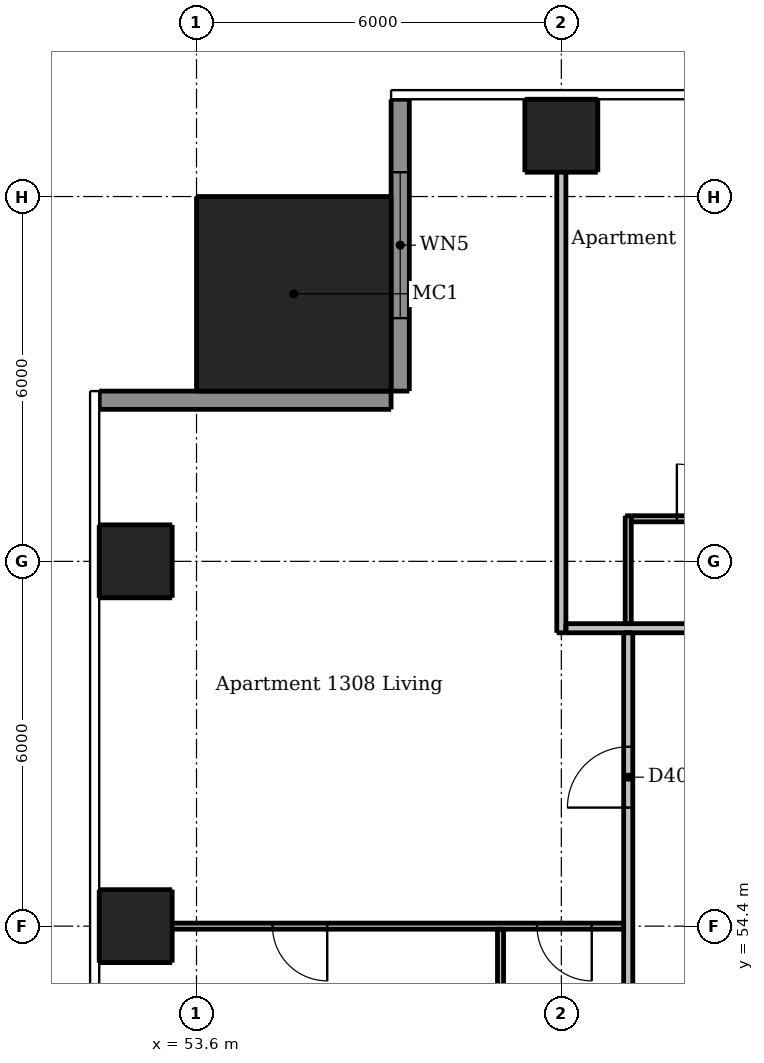
"""IFC4 building model, lengths in metres.
Left out: names, types, materials, properties, quantities, classifications, styles, units other than length and angle.
Written with IfcOpenShell. Run it as: python <this file> out.ifc"""

import sys

from ifc_helpers import new_model, si_unit, direction, frame, frame_2d, origin, origin_2d, place, context, subcontext, project, spatial, rectangle, extrude, element, fill, save


model = new_model("IFC4")
c1 = context("Model", 3, precision=1e-05, world=origin(), true_north=direction((0.0, 1.0)))
c2 = subcontext(c1, "Body", "Model", "MODEL_VIEW")
j1 = project(units=[si_unit("LENGTHUNIT", "METRE"), si_unit("PLANEANGLEUNIT", "RADIAN")], contexts=[c1])
p1 = place(None, origin())
s1 = spatial("IfcSite", under=j1, at=p1, CompositionType="ELEMENT")
p2 = place(p1, origin())
s2 = spatial("IfcBuilding", under=s1, at=p2, CompositionType="ELEMENT")
p3 = place(p2, frame((0.0, 0.0, 49.9)))
s3 = spatial("IfcBuildingStorey", under=s2, at=p3, CompositionType="ELEMENT", Elevation=49.9)
for number, where, z_axis, x_axis in (
    (1, (59.6, 67.4, 0.0), (0.0, 0.0, 1.0), (1.0, 0.0, 0.0)),
    (2, (52.6, 54.4, 0.0), (0.0, 0.0, 1.0), (1.0, 0.0, 0.0)),
    (3, (52.6, 60.4, 0.0), (0.0, 0.0, 1.0), (1.0, 0.0, 0.0)),
):
    element("IfcColumn", number, at=place(p3, frame(where, z_axis=z_axis, x_axis=x_axis)), inside=s3, PredefinedType="COLUMN", context=c2, shape_type="SweptSolid", body=[
        extrude(rectangle(XDim=1.2, YDim=1.2, at=origin_2d()), origin(), (0.0, 0.0, 1.0), 3.05),
    ])
p4 = place(p3, frame((55.2, 64.8, 0.0), z_axis=(0.0, 0.0, 1.0), x_axis=(1.0, 0.0, 0.0)))
e4 = element("IfcColumn", 4, at=p4, inside=s3, PredefinedType="COLUMN", context=c2, shape_type="SweptSolid", body=[
    extrude(rectangle(XDim=3.2, YDim=3.2, at=origin_2d()), origin(), (0.0, 0.0, 1.0), 3.3),
])
p5 = place(p3, frame((56.95, 68.0, 0.0), z_axis=(0.0, 0.0, 1.0), x_axis=(0.0, -1.0, 0.0)))
e5 = element("IfcWall", 5, at=p5, inside=s3, PredefinedType="SOLIDWALL", context=c2, shape_type="SweptSolid", body=[
    extrude(rectangle(XDim=4.8, YDim=0.3, at=frame_2d((2.4, 0.0))), origin(), (0.0, 0.0, 1.0), 3.05),
])
p6 = place(p5, frame((1.2, 0.0, 0.15)))
e6 = element("IfcOpeningElement", 6, at=p6, cuts=e5, PredefinedType="OPENING", context=c2, shape_type="SweptSolid", body=[
    extrude(rectangle(XDim=2.4, YDim=2.1, at=frame_2d((1.2, 1.05))), frame((0.0, 0.16, 0.0), z_axis=(0.0, -1.0, 0.0), x_axis=(1.0, 0.0, 0.0)), (0.0, 0.0, 1.0), 0.32),
])
p7 = place(p3, frame((56.8, 63.05, 0.0), z_axis=(0.0, 0.0, 1.0), x_axis=(-1.0, 0.0, 0.0)))
e7 = element("IfcWall", 7, at=p7, inside=s3, PredefinedType="SOLIDWALL", context=c2, shape_type="SweptSolid", body=[
    extrude(rectangle(XDim=4.8, YDim=0.3, at=frame_2d((2.4, 0.0))), origin(), (0.0, 0.0, 1.0), 3.05),
])
p8 = place(p3, frame((58.6, 54.35, 0.0), z_axis=(0.0, 0.0, 1.0), x_axis=(0.0, -1.0, 0.0)))
e8 = element("IfcWall", 8, at=p8, inside=s3, PredefinedType="PARTITIONING", context=c2, shape_type="SweptSolid", body=[
    extrude(rectangle(XDim=9.6, YDim=0.1, at=frame_2d((4.8, 0.0))), origin(), (0.0, 0.0, 1.0), 3.05),
])
p9 = place(p8, frame((7.35, 0.0, 0.0)))
e9 = element("IfcOpeningElement", 9, at=p9, cuts=e8, PredefinedType="OPENING", context=c2, shape_type="SweptSolid", body=[
    extrude(rectangle(XDim=0.8, YDim=2.1, at=frame_2d((0.4, 1.05))), frame((0.0, 0.06, 0.0), z_axis=(0.0, -1.0, 0.0), x_axis=(1.0, 0.0, 0.0)), (0.0, 0.0, 1.0), 0.12),
])
p10 = place(p8, frame((3.75, 0.0, 0.0)))
e10 = element("IfcOpeningElement", 10, at=p10, cuts=e8, PredefinedType="OPENING", context=c2, shape_type="SweptSolid", body=[
    extrude(rectangle(XDim=0.8, YDim=2.1, at=frame_2d((0.4, 1.05))), frame((0.0, 0.06, 0.0), z_axis=(0.0, -1.0, 0.0), x_axis=(1.0, 0.0, 0.0)), (0.0, 0.0, 1.0), 0.12),
])
p11 = place(p3, frame((60.7, 59.375, 0.0), z_axis=(0.0, 0.0, 1.0), x_axis=(0.0, 1.0, 0.0)))
e11 = element("IfcWall", 11, at=p11, inside=s3, PredefinedType="PARTITIONING", context=c2, shape_type="SweptSolid", body=[
    extrude(rectangle(XDim=1.775, YDim=0.1, at=frame_2d((0.887, 0.0))), origin(), (0.0, 0.0, 1.0), 3.05),
])
p12 = place(p3, frame((60.75, 61.1, 0.0), z_axis=(0.0, 0.0, 1.0), x_axis=(1.0, 0.0, 0.0)))
e12 = element("IfcWall", 12, at=p12, inside=s3, PredefinedType="PARTITIONING", context=c2, shape_type="SweptSolid", body=[
    extrude(rectangle(XDim=16.775, YDim=0.1, at=frame_2d((8.387, 0.0))), origin(), (0.0, 0.0, 1.0), 3.05),
])
p13 = place(p12, frame((11.3, 0.0, 0.0)))
e13 = element("IfcOpeningElement", 13, at=p13, cuts=e12, PredefinedType="OPENING", context=c2, shape_type="SweptSolid", body=[
    extrude(rectangle(XDim=0.9, YDim=2.1, at=frame_2d((0.45, 1.05))), frame((0.0, 0.06, 0.0), z_axis=(0.0, -1.0, 0.0), x_axis=(1.0, 0.0, 0.0)), (0.0, 0.0, 1.0), 0.12),
])
p14 = place(p12, frame((15.2, 0.0, 0.0)))
e14 = element("IfcOpeningElement", 14, at=p14, cuts=e12, PredefinedType="OPENING", context=c2, shape_type="SweptSolid", body=[
    extrude(rectangle(XDim=0.9, YDim=2.1, at=frame_2d((0.45, 1.05))), frame((0.0, 0.06, 0.0), z_axis=(0.0, -1.0, 0.0), x_axis=(1.0, 0.0, 0.0)), (0.0, 0.0, 1.0), 0.12),
])
p15 = place(p12, frame((13.1, 0.0, 0.0)))
e15 = element("IfcOpeningElement", 15, at=p15, cuts=e12, PredefinedType="OPENING", context=c2, shape_type="SweptSolid", body=[
    extrude(rectangle(XDim=0.9, YDim=2.1, at=frame_2d((0.45, 1.05))), frame((0.0, 0.06, 0.0), z_axis=(0.0, -1.0, 0.0), x_axis=(1.0, 0.0, 0.0)), (0.0, 0.0, 1.0), 0.12),
])
p16 = place(p12, frame((0.75, 0.0, 0.0)))
e16 = element("IfcOpeningElement", 16, at=p16, cuts=e12, PredefinedType="OPENING", context=c2, shape_type="SweptSolid", body=[
    extrude(rectangle(XDim=0.9, YDim=2.1, at=frame_2d((0.45, 1.05))), frame((0.0, 0.06, 0.0), z_axis=(0.0, -1.0, 0.0), x_axis=(1.0, 0.0, 0.0)), (0.0, 0.0, 1.0), 0.12),
])
p17 = place(p12, frame((6.2, 0.0, 0.0)))
e17 = element("IfcOpeningElement", 17, at=p17, cuts=e12, PredefinedType="OPENING", context=c2, shape_type="SweptSolid", body=[
    extrude(rectangle(XDim=0.9, YDim=2.1, at=frame_2d((0.45, 1.05))), frame((0.0, 0.06, 0.0), z_axis=(0.0, -1.0, 0.0), x_axis=(1.0, 0.0, 0.0)), (0.0, 0.0, 1.0), 0.12),
])
p18 = place(p12, frame((3.25, 0.0, 0.0)))
e18 = element("IfcOpeningElement", 18, at=p18, cuts=e12, PredefinedType="OPENING", context=c2, shape_type="SweptSolid", body=[
    extrude(rectangle(XDim=0.8, YDim=2.1, at=frame_2d((0.4, 1.05))), frame((0.0, 0.06, 0.0), z_axis=(0.0, -1.0, 0.0), x_axis=(1.0, 0.0, 0.0)), (0.0, 0.0, 1.0), 0.12),
])
p19 = place(p12, frame((9.25, 0.0, 0.0)))
e19 = element("IfcOpeningElement", 19, at=p19, cuts=e12, PredefinedType="OPENING", context=c2, shape_type="SweptSolid", body=[
    extrude(rectangle(XDim=0.8, YDim=2.1, at=frame_2d((0.4, 1.05))), frame((0.0, 0.06, 0.0), z_axis=(0.0, -1.0, 0.0), x_axis=(1.0, 0.0, 0.0)), (0.0, 0.0, 1.0), 0.12),
])
p20 = place(p3, frame((60.625, 54.4, 0.0), z_axis=(0.0, 0.0, 1.0), x_axis=(-1.0, 0.0, 0.0)))
e20 = element("IfcWall", 20, at=p20, inside=s3, PredefinedType="PARTITIONING", context=c2, shape_type="SweptSolid", body=[
    extrude(rectangle(XDim=8.625, YDim=0.1, at=frame_2d((4.312, 0.0))), origin(), (0.0, 0.0, 1.0), 2.516),
])
p21 = place(p20, frame((0.525, 0.0, 0.0)))
e21 = element("IfcOpeningElement", 21, at=p21, cuts=e20, PredefinedType="OPENING", context=c2, shape_type="SweptSolid", body=[
    extrude(rectangle(XDim=0.9, YDim=2.1, at=frame_2d((0.45, 1.05))), frame((0.0, 0.06, 0.0), z_axis=(0.0, -1.0, 0.0), x_axis=(1.0, 0.0, 0.0)), (0.0, 0.0, 1.0), 0.12),
])
p22 = place(p20, frame((4.875, 0.0, 0.0)))
e22 = element("IfcOpeningElement", 22, at=p22, cuts=e20, PredefinedType="OPENING", context=c2, shape_type="SweptSolid", body=[
    extrude(rectangle(XDim=0.9, YDim=2.1, at=frame_2d((0.45, 1.05))), frame((0.0, 0.06, 0.0), z_axis=(0.0, -1.0, 0.0), x_axis=(1.0, 0.0, 0.0)), (0.0, 0.0, 1.0), 0.12),
])
p23 = place(p3, frame((59.6, 59.225, 0.0), z_axis=(0.0, 0.0, 1.0), x_axis=(0.0, 1.0, 0.0)))
e23 = element("IfcWall", 23, at=p23, inside=s3, PredefinedType="PARTITIONING", context=c2, shape_type="SweptSolid", body=[
    extrude(rectangle(XDim=8.775, YDim=0.15, at=frame_2d((4.387, 0.0))), origin(), (0.0, 0.0, 1.0), 2.51),
])
p24 = place(p3, frame((60.7, 30.325, 0.0), z_axis=(0.0, 0.0, 1.0), x_axis=(0.0, 1.0, 0.0)))
e24 = element("IfcWall", 24, at=p24, inside=s3, PredefinedType="PARTITIONING", context=c2, shape_type="SweptSolid", body=[
    extrude(rectangle(XDim=28.9, YDim=0.15, at=frame_2d((14.45, 0.0))), origin(), (0.0, 0.0, 1.0), 3.05),
])
p25 = place(p24, frame((7.375, 0.0, 0.0)))
e25 = element("IfcOpeningElement", 25, at=p25, cuts=e24, PredefinedType="OPENING", context=c2, shape_type="SweptSolid", body=[
    extrude(rectangle(XDim=1.0, YDim=2.1, at=frame_2d((0.5, 1.05))), frame((0.0, 0.085, 0.0), z_axis=(0.0, -1.0, 0.0), x_axis=(1.0, 0.0, 0.0)), (0.0, 0.0, 1.0), 0.17),
])
p26 = place(p24, frame((26.025, 0.0, 0.0)))
e26 = element("IfcOpeningElement", 26, at=p26, cuts=e24, PredefinedType="OPENING", context=c2, shape_type="SweptSolid", body=[
    extrude(rectangle(XDim=1.0, YDim=2.1, at=frame_2d((0.5, 1.05))), frame((0.0, 0.085, 0.0), z_axis=(0.0, -1.0, 0.0), x_axis=(1.0, 0.0, 0.0)), (0.0, 0.0, 1.0), 0.17),
])
p27 = place(p3, frame((59.675, 59.3, 0.0), z_axis=(0.0, 0.0, 1.0), x_axis=(1.0, 0.0, 0.0)))
e27 = element("IfcWall", 27, at=p27, inside=s3, PredefinedType="PARTITIONING", context=c2, shape_type="SweptSolid", body=[
    extrude(rectangle(XDim=28.55, YDim=0.15, at=frame_2d((14.275, 0.0))), origin(), (0.0, 0.0, 1.0), 3.05),
])
p28 = place(p27, frame((8.975, 0.0, 0.0)))
e28 = element("IfcOpeningElement", 28, at=p28, cuts=e27, PredefinedType="OPENING", context=c2, shape_type="SweptSolid", body=[
    extrude(rectangle(XDim=1.0, YDim=2.1, at=frame_2d((0.5, 1.05))), frame((0.0, 0.085, 0.0), z_axis=(0.0, -1.0, 0.0), x_axis=(1.0, 0.0, 0.0)), (0.0, 0.0, 1.0), 0.17),
])
p29 = place(p27, frame((25.775, 0.0, 0.0)))
e29 = element("IfcOpeningElement", 29, at=p29, cuts=e27, PredefinedType="OPENING", context=c2, shape_type="SweptSolid", body=[
    extrude(rectangle(XDim=1.0, YDim=2.1, at=frame_2d((0.5, 1.05))), frame((0.0, 0.085, 0.0), z_axis=(0.0, -1.0, 0.0), x_axis=(1.0, 0.0, 0.0)), (0.0, 0.0, 1.0), 0.17),
])
p30 = place(p6, origin())
e30 = element("IfcWindow", 30, at=p30, inside=s3, PartitioningType="DOUBLE_PANEL_VERTICAL", PredefinedType="WINDOW", context=c2, shape_type="SweptSolid", body=[
    extrude(rectangle(XDim=2.4, YDim=2.1, at=frame_2d((1.2, 1.05))), frame((0.0, 0.03, 0.0), z_axis=(0.0, -1.0, 0.0), x_axis=(1.0, 0.0, 0.0)), (0.0, 0.0, 1.0), 0.06),
])
fill(e6, e30)
p31 = place(p16, origin())
e31 = element("IfcDoor", 31, at=p31, inside=s3, OperationType="SINGLE_SWING_LEFT", PredefinedType="DOOR", context=c2, shape_type="SweptSolid", body=[
    extrude(rectangle(XDim=0.9, YDim=2.1, at=frame_2d((0.45, 1.05))), frame((0.0, 0.025, 0.0), z_axis=(0.0, -1.0, 0.0), x_axis=(1.0, 0.0, 0.0)), (0.0, 0.0, 1.0), 0.05),
])
fill(e16, e31)
p32 = place(p26, origin())
e32 = element("IfcDoor", 32, at=p32, inside=s3, OperationType="SINGLE_SWING_LEFT", PredefinedType="DOOR", context=c2, shape_type="SweptSolid", body=[
    extrude(rectangle(XDim=1.0, YDim=2.1, at=frame_2d((0.5, 1.05))), frame((0.0, 0.025, 0.0), z_axis=(0.0, -1.0, 0.0), x_axis=(1.0, 0.0, 0.0)), (0.0, 0.0, 1.0), 0.05),
])
fill(e26, e32)
p33 = place(p21, origin())
e33 = element("IfcDoor", 33, at=p33, inside=s3, OperationType="SINGLE_SWING_LEFT", PredefinedType="DOOR", context=c2, shape_type="SweptSolid", body=[
    extrude(rectangle(XDim=0.9, YDim=2.1, at=frame_2d((0.45, 1.05))), frame((0.0, 0.025, 0.0), z_axis=(0.0, -1.0, 0.0), x_axis=(1.0, 0.0, 0.0)), (0.0, 0.0, 1.0), 0.05),
])
fill(e21, e33)
p34 = place(p22, origin())
e34 = element("IfcDoor", 34, at=p34, inside=s3, OperationType="SINGLE_SWING_LEFT", PredefinedType="DOOR", context=c2, shape_type="SweptSolid", body=[
    extrude(rectangle(XDim=0.9, YDim=2.1, at=frame_2d((0.45, 1.05))), frame((0.0, 0.025, 0.0), z_axis=(0.0, -1.0, 0.0), x_axis=(1.0, 0.0, 0.0)), (0.0, 0.0, 1.0), 0.05),
])
fill(e22, e34)
save(model, sys.argv[1])
